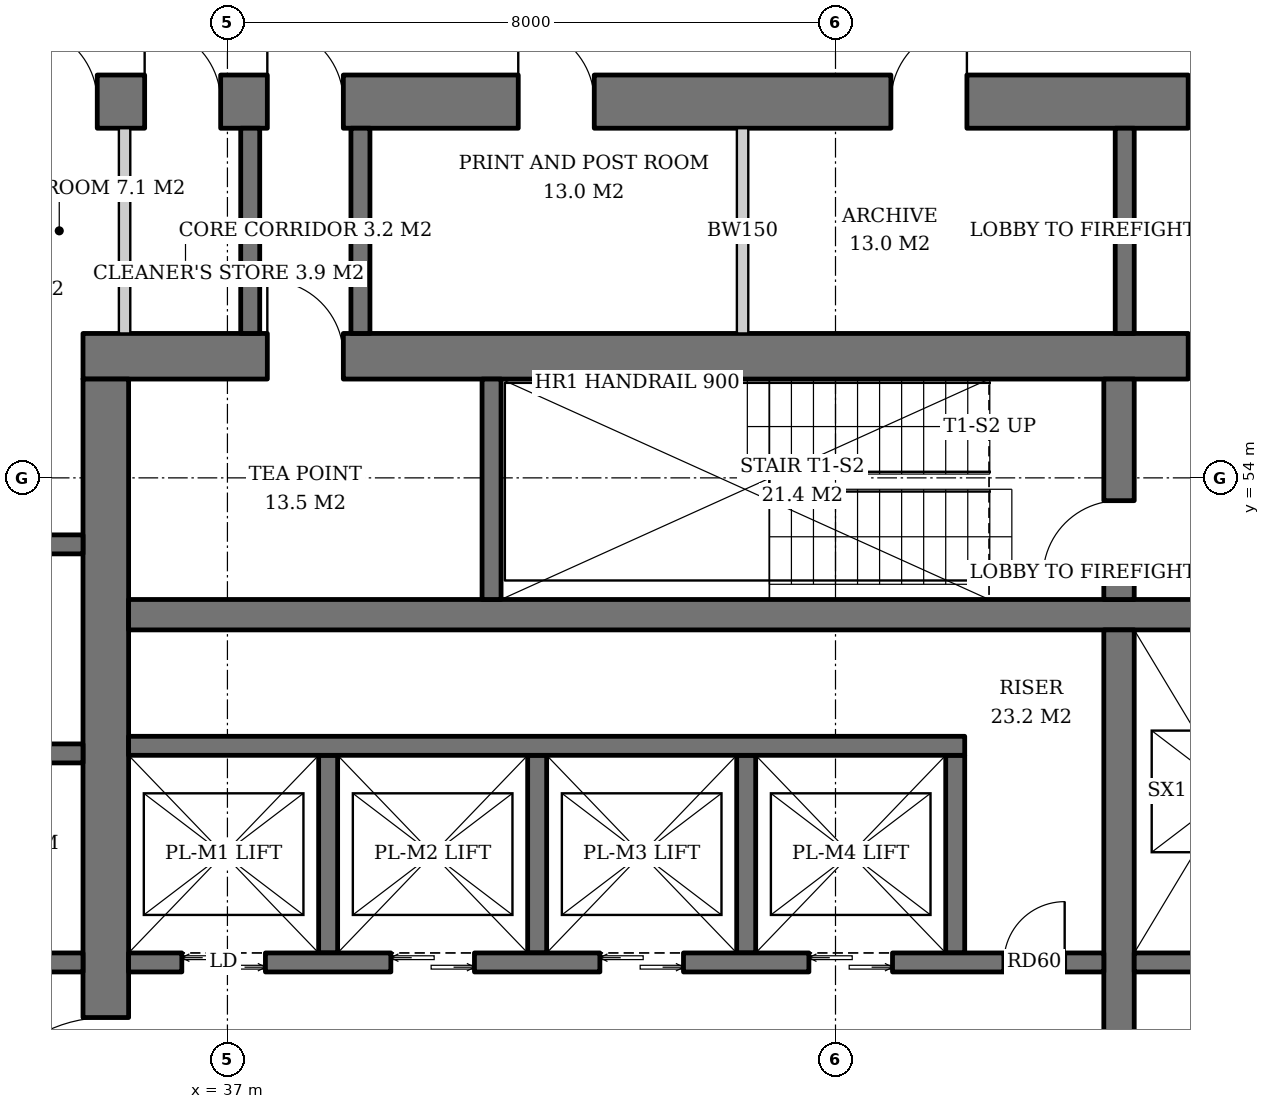
"""IFC4 building model, lengths in metres.
Left out: names, types, materials, properties, quantities, classifications, styles, units other than length and angle.
Written with IfcOpenShell. Run it as: python <this file> out.ifc"""

import sys

from ifc_helpers import new_model, si_unit, direction, frame, frame_2d, origin, place, context, subcontext, project, spatial, rectangle, extrude, element, fill, save


model = new_model("IFC4")
c1 = context("Model", 3, precision=1e-05, world=origin(), true_north=direction((0.0, 1.0)))
c2 = subcontext(c1, "Body", "Model", "MODEL_VIEW")
j1 = project(units=[si_unit("LENGTHUNIT", "METRE"), si_unit("PLANEANGLEUNIT", "RADIAN")], contexts=[c1])
p1 = place(None, origin())
s1 = spatial("IfcSite", under=j1, at=p1, CompositionType="ELEMENT")
p2 = place(p1, origin())
s2 = spatial("IfcBuilding", under=s1, at=p2, CompositionType="ELEMENT")
p3 = place(p2, frame((0.0, 0.0, 104.6)))
s3 = spatial("IfcBuildingStorey", under=s2, at=p3, CompositionType="ELEMENT", Elevation=104.6)
p4 = place(p3, frame((35.1, 55.6, 0.0), z_axis=(0.0, 0.0, 1.0), x_axis=(1.0, 0.0, 0.0)))
e1 = element("IfcWall", 1, at=p4, inside=s3, PredefinedType="SHEAR", context=c2, shape_type="SweptSolid", body=[
    extrude(rectangle(XDim=19.8, YDim=0.6, at=frame_2d((9.9, 0.0))), origin(), (0.0, 0.0, 1.0), 3.8),
])
p5 = place(p4, frame((14.54, 0.0, 0.0)))
e2 = element("IfcOpeningElement", 2, at=p5, cuts=e1, PredefinedType="OPENING", context=c2, shape_type="SweptSolid", body=[
    extrude(rectangle(XDim=1.0, YDim=2.1, at=frame_2d((0.5, 1.05))), frame((0.0, 0.31, 0.0), z_axis=(0.0, -1.0, 0.0), x_axis=(1.0, 0.0, 0.0)), (0.0, 0.0, 1.0), 0.62),
])
p6 = place(p4, frame((2.425, 0.0, 0.0)))
e3 = element("IfcOpeningElement", 3, at=p6, cuts=e1, PredefinedType="OPENING", context=c2, shape_type="SweptSolid", body=[
    extrude(rectangle(XDim=1.0, YDim=2.1, at=frame_2d((0.5, 1.05))), frame((0.0, 0.31, 0.0), z_axis=(0.0, -1.0, 0.0), x_axis=(1.0, 0.0, 0.0)), (0.0, 0.0, 1.0), 0.62),
])
p7 = place(p3, frame((35.4, 36.7, 0.0), z_axis=(0.0, 0.0, 1.0), x_axis=(0.0, 1.0, 0.0)))
e4 = element("IfcWall", 4, at=p7, inside=s3, PredefinedType="SHEAR", context=c2, shape_type="SweptSolid", body=[
    extrude(rectangle(XDim=18.6, YDim=0.6, at=frame_2d((9.3, 0.0))), origin(), (0.0, 0.0, 1.0), 3.8),
])
p8 = place(p7, frame((8.4, 0.0, 0.0)))
e5 = element("IfcOpeningElement", 5, at=p8, cuts=e4, PredefinedType="OPENING", context=c2, shape_type="SweptSolid", body=[
    extrude(rectangle(XDim=1.8, YDim=2.4, at=frame_2d((0.9, 1.2))), frame((0.0, 0.31, 0.0), z_axis=(0.0, -1.0, 0.0), x_axis=(1.0, 0.0, 0.0)), (0.0, 0.0, 1.0), 0.62),
])
p9 = place(p3, frame((31.7, 58.95, 0.0), z_axis=(0.0, 0.0, 1.0), x_axis=(1.0, 0.0, 0.0)))
e6 = element("IfcWall", 6, at=p9, inside=s3, PredefinedType="SHEAR", context=c2, shape_type="SweptSolid", body=[
    extrude(rectangle(XDim=26.6, YDim=0.7, at=frame_2d((13.3, 0.0))), origin(), (0.0, 0.0, 1.0), 3.8),
])
p10 = place(p9, frame((17.94, 0.0, 0.0)))
e7 = element("IfcOpeningElement", 7, at=p10, cuts=e6, PredefinedType="OPENING", context=c2, shape_type="SweptSolid", body=[
    extrude(rectangle(XDim=1.0, YDim=2.1, at=frame_2d((0.5, 1.05))), frame((0.0, 0.36, 0.0), z_axis=(0.0, -1.0, 0.0), x_axis=(1.0, 0.0, 0.0)), (0.0, 0.0, 1.0), 0.72),
])
p11 = place(p9, frame((5.825, 0.0, 0.0)))
e8 = element("IfcOpeningElement", 8, at=p11, cuts=e6, PredefinedType="OPENING", context=c2, shape_type="SweptSolid", body=[
    extrude(rectangle(XDim=1.0, YDim=2.1, at=frame_2d((0.5, 1.05))), frame((0.0, 0.36, 0.0), z_axis=(0.0, -1.0, 0.0), x_axis=(1.0, 0.0, 0.0)), (0.0, 0.0, 1.0), 0.72),
])
p12 = place(p9, frame((0.978, 0.0, 0.0)))
e9 = element("IfcOpeningElement", 9, at=p12, cuts=e6, PredefinedType="OPENING", context=c2, shape_type="SweptSolid", body=[
    extrude(rectangle(XDim=1.0, YDim=2.1, at=frame_2d((0.5, 1.05))), frame((0.0, 0.36, 0.0), z_axis=(0.0, -1.0, 0.0), x_axis=(1.0, 0.0, 0.0)), (0.0, 0.0, 1.0), 0.72),
])
p13 = place(p9, frame((2.587, 0.0, 0.0)))
e10 = element("IfcOpeningElement", 10, at=p13, cuts=e6, PredefinedType="OPENING", context=c2, shape_type="SweptSolid", body=[
    extrude(rectangle(XDim=1.0, YDim=2.1, at=frame_2d((0.5, 1.05))), frame((0.0, 0.36, 0.0), z_axis=(0.0, -1.0, 0.0), x_axis=(1.0, 0.0, 0.0)), (0.0, 0.0, 1.0), 0.72),
])
p14 = place(p9, frame((4.211, 0.0, 0.0)))
e11 = element("IfcOpeningElement", 11, at=p14, cuts=e6, PredefinedType="OPENING", context=c2, shape_type="SweptSolid", body=[
    extrude(rectangle(XDim=1.0, YDim=2.1, at=frame_2d((0.5, 1.05))), frame((0.0, 0.36, 0.0), z_axis=(0.0, -1.0, 0.0), x_axis=(1.0, 0.0, 0.0)), (0.0, 0.0, 1.0), 0.72),
])
p15 = place(p9, frame((9.126, 0.0, 0.0)))
e12 = element("IfcOpeningElement", 12, at=p15, cuts=e6, PredefinedType="OPENING", context=c2, shape_type="SweptSolid", body=[
    extrude(rectangle(XDim=1.0, YDim=2.1, at=frame_2d((0.5, 1.05))), frame((0.0, 0.36, 0.0), z_axis=(0.0, -1.0, 0.0), x_axis=(1.0, 0.0, 0.0)), (0.0, 0.0, 1.0), 0.72),
])
p16 = place(p9, frame((14.029, 0.0, 0.0)))
e13 = element("IfcOpeningElement", 13, at=p16, cuts=e6, PredefinedType="OPENING", context=c2, shape_type="SweptSolid", body=[
    extrude(rectangle(XDim=1.0, YDim=2.1, at=frame_2d((0.5, 1.05))), frame((0.0, 0.36, 0.0), z_axis=(0.0, -1.0, 0.0), x_axis=(1.0, 0.0, 0.0)), (0.0, 0.0, 1.0), 0.72),
])
p17 = place(p9, frame((22.4, 0.0, 0.0)))
e14 = element("IfcOpeningElement", 14, at=p17, cuts=e6, PredefinedType="OPENING", context=c2, shape_type="SweptSolid", body=[
    extrude(rectangle(XDim=1.0, YDim=2.1, at=frame_2d((0.5, 1.05))), frame((0.0, 0.36, 0.0), z_axis=(0.0, -1.0, 0.0), x_axis=(1.0, 0.0, 0.0)), (0.0, 0.0, 1.0), 0.72),
])
p18 = place(p3, frame((35.7, 52.2, 0.0), z_axis=(0.0, 0.0, 1.0), x_axis=(1.0, 0.0, 0.0)))
e15 = element("IfcWall", 15, at=p18, inside=s3, PredefinedType="SHEAR", context=c2, shape_type="SweptSolid", body=[
    extrude(rectangle(XDim=18.6, YDim=0.4, at=frame_2d((9.3, 0.0))), origin(), (0.0, 0.0, 1.0), 3.8),
])
p19 = place(p3, frame((48.73, 40.0, 0.0), z_axis=(0.0, 0.0, 1.0), x_axis=(0.0, 1.0, 0.0)))
e16 = element("IfcWall", 16, at=p19, inside=s3, PredefinedType="SHEAR", context=c2, shape_type="SweptSolid", body=[
    extrude(rectangle(XDim=12.0, YDim=0.4, at=frame_2d((6.0, 0.0))), origin(), (0.0, 0.0, 1.0), 3.8),
])
p20 = place(p3, frame((48.73, 52.4, 0.0), z_axis=(0.0, 0.0, 1.0), x_axis=(0.0, 1.0, 0.0)))
e17 = element("IfcWall", 17, at=p20, inside=s3, PredefinedType="SHEAR", context=c2, shape_type="SweptSolid", body=[
    extrude(rectangle(XDim=2.9, YDim=0.4, at=frame_2d((1.45, 0.0))), origin(), (0.0, 0.0, 1.0), 3.8),
])
p21 = place(p20, frame((0.3, 0.0, 0.0)))
e18 = element("IfcOpeningElement", 18, at=p21, cuts=e17, PredefinedType="OPENING", context=c2, shape_type="SweptSolid", body=[
    extrude(rectangle(XDim=1.0, YDim=2.1, at=frame_2d((0.5, 1.05))), frame((0.0, 0.21, 0.0), z_axis=(0.0, -1.0, 0.0), x_axis=(1.0, 0.0, 0.0)), (0.0, 0.0, 1.0), 0.42),
])
p22 = place(p3, frame((40.475, 52.4, 0.0), z_axis=(0.0, 0.0, 1.0), x_axis=(0.0, 1.0, 0.0)))
e19 = element("IfcWall", 19, at=p22, inside=s3, PredefinedType="SHEAR", context=c2, shape_type="SweptSolid", body=[
    extrude(rectangle(XDim=2.9, YDim=0.25, at=frame_2d((1.45, 0.0))), origin(), (0.0, 0.0, 1.0), 3.8),
])
for number, where, z_axis, x_axis in (
    (20, (38.325, 47.75, 0.0), (0.0, 0.0, 1.0), (0.0, 1.0, 0.0)),
    (21, (41.075, 47.75, 0.0), (0.0, 0.0, 1.0), (0.0, 1.0, 0.0)),
    (22, (43.825, 47.75, 0.0), (0.0, 0.0, 1.0), (0.0, 1.0, 0.0)),
    (23, (46.575, 47.75, 0.0), (0.0, 0.0, 1.0), (0.0, 1.0, 0.0)),
):
    element("IfcWall", number, at=place(p3, frame(where, z_axis=z_axis, x_axis=x_axis)), inside=s3, PredefinedType="SHEAR", context=c2, shape_type="SweptSolid", body=[
        extrude(rectangle(XDim=2.6, YDim=0.25, at=frame_2d((1.3, 0.0))), origin(), (0.0, 0.0, 1.0), 3.8),
    ])
p23 = place(p3, frame((35.7, 50.475, 0.0), z_axis=(0.0, 0.0, 1.0), x_axis=(1.0, 0.0, 0.0)))
e24 = element("IfcWall", 24, at=p23, inside=s3, PredefinedType="SHEAR", context=c2, shape_type="SweptSolid", body=[
    extrude(rectangle(XDim=11.0, YDim=0.25, at=frame_2d((5.5, 0.0))), origin(), (0.0, 0.0, 1.0), 3.8),
])
p24 = place(p3, frame((35.7, 47.625, 0.0), z_axis=(0.0, 0.0, 1.0), x_axis=(1.0, 0.0, 0.0)))
e25 = element("IfcWall", 25, at=p24, inside=s3, PredefinedType="SHEAR", context=c2, shape_type="SweptSolid", body=[
    extrude(rectangle(XDim=12.83, YDim=0.25, at=frame_2d((6.415, 0.0))), origin(), (0.0, 0.0, 1.0), 3.8),
])
p25 = place(p24, frame((0.7, 0.0, 0.0)))
e26 = element("IfcOpeningElement", 26, at=p25, cuts=e25, PredefinedType="OPENING", context=c2, shape_type="SweptSolid", body=[
    extrude(rectangle(XDim=1.1, YDim=2.2, at=frame_2d((0.55, 1.1))), frame((0.0, 0.135, 0.0), z_axis=(0.0, -1.0, 0.0), x_axis=(1.0, 0.0, 0.0)), (0.0, 0.0, 1.0), 0.27),
])
p26 = place(p24, frame((3.45, 0.0, 0.0)))
e27 = element("IfcOpeningElement", 27, at=p26, cuts=e25, PredefinedType="OPENING", context=c2, shape_type="SweptSolid", body=[
    extrude(rectangle(XDim=1.1, YDim=2.2, at=frame_2d((0.55, 1.1))), frame((0.0, 0.135, 0.0), z_axis=(0.0, -1.0, 0.0), x_axis=(1.0, 0.0, 0.0)), (0.0, 0.0, 1.0), 0.27),
])
p27 = place(p24, frame((6.2, 0.0, 0.0)))
e28 = element("IfcOpeningElement", 28, at=p27, cuts=e25, PredefinedType="OPENING", context=c2, shape_type="SweptSolid", body=[
    extrude(rectangle(XDim=1.1, YDim=2.2, at=frame_2d((0.55, 1.1))), frame((0.0, 0.135, 0.0), z_axis=(0.0, -1.0, 0.0), x_axis=(1.0, 0.0, 0.0)), (0.0, 0.0, 1.0), 0.27),
])
p28 = place(p24, frame((8.95, 0.0, 0.0)))
e29 = element("IfcOpeningElement", 29, at=p28, cuts=e25, PredefinedType="OPENING", context=c2, shape_type="SweptSolid", body=[
    extrude(rectangle(XDim=1.1, YDim=2.2, at=frame_2d((0.55, 1.1))), frame((0.0, 0.135, 0.0), z_axis=(0.0, -1.0, 0.0), x_axis=(1.0, 0.0, 0.0)), (0.0, 0.0, 1.0), 0.27),
])
p29 = place(p24, frame((11.515, 0.0, 0.0)))
e30 = element("IfcOpeningElement", 30, at=p29, cuts=e25, PredefinedType="OPENING", context=c2, shape_type="SweptSolid", body=[
    extrude(rectangle(XDim=0.8, YDim=2.0, at=frame_2d((0.4, 1.0))), frame((0.0, 0.135, 0.0), z_axis=(0.0, -1.0, 0.0), x_axis=(1.0, 0.0, 0.0)), (0.0, 0.0, 1.0), 0.27),
])
p30 = place(p3, frame((48.93, 47.625, 0.0), z_axis=(0.0, 0.0, 1.0), x_axis=(1.0, 0.0, 0.0)))
e31 = element("IfcWall", 31, at=p30, inside=s3, PredefinedType="SHEAR", context=c2, shape_type="SweptSolid", body=[
    extrude(rectangle(XDim=5.37, YDim=0.25, at=frame_2d((2.685, 0.0))), origin(), (0.0, 0.0, 1.0), 3.8),
])
for number, where, z_axis, x_axis in (
    (32, (32.4, 47.625, 0.0), (0.0, 0.0, 1.0), (1.0, 0.0, 0.0)),
    (33, (32.4, 50.375, 0.0), (0.0, 0.0, 1.0), (1.0, 0.0, 0.0)),
    (34, (32.4, 53.125, 0.0), (0.0, 0.0, 1.0), (1.0, 0.0, 0.0)),
):
    element("IfcWall", number, at=place(p3, frame(where, z_axis=z_axis, x_axis=x_axis)), inside=s3, PredefinedType="SHEAR", context=c2, shape_type="SweptSolid", body=[
        extrude(rectangle(XDim=2.7, YDim=0.25, at=frame_2d((1.35, 0.0))), origin(), (0.0, 0.0, 1.0), 3.8),
    ])
for number, where, z_axis, x_axis in (
    (35, (48.805, 55.9, 0.0), (0.0, 0.0, 1.0), (0.0, 1.0, 0.0)),
    (36, (37.3, 55.9, 0.0), (0.0, 0.0, 1.0), (0.0, 1.0, 0.0)),
    (37, (38.75, 55.9, 0.0), (0.0, 0.0, 1.0), (0.0, 1.0, 0.0)),
):
    element("IfcWall", number, at=place(p3, frame(where, z_axis=z_axis, x_axis=x_axis)), inside=s3, PredefinedType="SOLIDWALL", context=c2, shape_type="SweptSolid", body=[
        extrude(rectangle(XDim=2.7, YDim=0.25, at=frame_2d((1.35, 0.0))), origin(), (0.0, 0.0, 1.0), 3.62),
    ])
for number, where, z_axis, x_axis in (
    (38, (35.647, 55.9, 0.0), (0.0, 0.0, 1.0), (0.0, 1.0, 0.0)),
    (39, (43.778, 55.9, 0.0), (0.0, 0.0, 1.0), (0.0, 1.0, 0.0)),
):
    element("IfcWall", number, at=place(p3, frame(where, z_axis=z_axis, x_axis=x_axis)), inside=s3, PredefinedType="SOLIDWALL", context=c2, shape_type="SweptSolid", body=[
        extrude(rectangle(XDim=2.7, YDim=0.15, at=frame_2d((1.35, 0.0))), origin(), (0.0, 0.0, 1.0), 3.62),
    ])
p31 = place(p25, origin())
e40 = element("IfcDoor", 40, at=p31, inside=s3, OperationType="DOUBLE_DOOR_SLIDING", PredefinedType="DOOR", context=c2, shape_type="SweptSolid", body=[
    extrude(rectangle(XDim=1.1, YDim=2.2, at=frame_2d((0.55, 1.1))), frame((0.0, 0.025, 0.0), z_axis=(0.0, -1.0, 0.0), x_axis=(1.0, 0.0, 0.0)), (0.0, 0.0, 1.0), 0.05),
])
fill(e26, e40)
p32 = place(p26, origin())
e41 = element("IfcDoor", 41, at=p32, inside=s3, OperationType="DOUBLE_DOOR_SLIDING", PredefinedType="DOOR", context=c2, shape_type="SweptSolid", body=[
    extrude(rectangle(XDim=1.1, YDim=2.2, at=frame_2d((0.55, 1.1))), frame((0.0, 0.025, 0.0), z_axis=(0.0, -1.0, 0.0), x_axis=(1.0, 0.0, 0.0)), (0.0, 0.0, 1.0), 0.05),
])
fill(e27, e41)
p33 = place(p27, origin())
e42 = element("IfcDoor", 42, at=p33, inside=s3, OperationType="DOUBLE_DOOR_SLIDING", PredefinedType="DOOR", context=c2, shape_type="SweptSolid", body=[
    extrude(rectangle(XDim=1.1, YDim=2.2, at=frame_2d((0.55, 1.1))), frame((0.0, 0.025, 0.0), z_axis=(0.0, -1.0, 0.0), x_axis=(1.0, 0.0, 0.0)), (0.0, 0.0, 1.0), 0.05),
])
fill(e28, e42)
p34 = place(p28, origin())
e43 = element("IfcDoor", 43, at=p34, inside=s3, OperationType="DOUBLE_DOOR_SLIDING", PredefinedType="DOOR", context=c2, shape_type="SweptSolid", body=[
    extrude(rectangle(XDim=1.1, YDim=2.2, at=frame_2d((0.55, 1.1))), frame((0.0, 0.025, 0.0), z_axis=(0.0, -1.0, 0.0), x_axis=(1.0, 0.0, 0.0)), (0.0, 0.0, 1.0), 0.05),
])
fill(e29, e43)
p35 = place(p29, origin())
e44 = element("IfcDoor", 44, at=p35, inside=s3, OperationType="SINGLE_SWING_RIGHT", PredefinedType="DOOR", context=c2, shape_type="SweptSolid", body=[
    extrude(rectangle(XDim=0.8, YDim=2.0, at=frame_2d((0.4, 1.0))), frame((0.0, 0.025, 0.0), z_axis=(0.0, -1.0, 0.0), x_axis=(1.0, 0.0, 0.0)), (0.0, 0.0, 1.0), 0.05),
])
fill(e30, e44)
p36 = place(p21, origin())
e45 = element("IfcDoor", 45, at=p36, inside=s3, OperationType="SINGLE_SWING_LEFT", PredefinedType="DOOR", context=c2, shape_type="SweptSolid", body=[
    extrude(rectangle(XDim=1.0, YDim=2.1, at=frame_2d((0.5, 1.05))), frame((0.0, 0.025, 0.0), z_axis=(0.0, -1.0, 0.0), x_axis=(1.0, 0.0, 0.0)), (0.0, 0.0, 1.0), 0.05),
])
fill(e18, e45)
p37 = place(p5, origin())
e46 = element("IfcDoor", 46, at=p37, inside=s3, OperationType="SINGLE_SWING_RIGHT", PredefinedType="DOOR", context=c2, shape_type="SweptSolid", body=[
    extrude(rectangle(XDim=1.0, YDim=2.1, at=frame_2d((0.5, 1.05))), frame((0.0, 0.025, 0.0), z_axis=(0.0, -1.0, 0.0), x_axis=(1.0, 0.0, 0.0)), (0.0, 0.0, 1.0), 0.05),
])
fill(e2, e46)
p38 = place(p8, origin())
e47 = element("IfcDoor", 47, at=p38, inside=s3, OperationType="DOUBLE_DOOR_SINGLE_SWING", PredefinedType="DOOR", context=c2, shape_type="SweptSolid", body=[
    extrude(rectangle(XDim=1.8, YDim=2.4, at=frame_2d((0.9, 1.2))), frame((0.0, 0.025, 0.0), z_axis=(0.0, -1.0, 0.0), x_axis=(1.0, 0.0, 0.0)), (0.0, 0.0, 1.0), 0.05),
])
fill(e5, e47)
p39 = place(p10, origin())
e48 = element("IfcDoor", 48, at=p39, inside=s3, OperationType="SINGLE_SWING_RIGHT", PredefinedType="DOOR", context=c2, shape_type="SweptSolid", body=[
    extrude(rectangle(XDim=1.0, YDim=2.1, at=frame_2d((0.5, 1.05))), frame((0.0, 0.025, 0.0), z_axis=(0.0, -1.0, 0.0), x_axis=(1.0, 0.0, 0.0)), (0.0, 0.0, 1.0), 0.05),
])
fill(e7, e48)
p40 = place(p11, origin())
e49 = element("IfcDoor", 49, at=p40, inside=s3, OperationType="SINGLE_SWING_LEFT", PredefinedType="DOOR", context=c2, shape_type="SweptSolid", body=[
    extrude(rectangle(XDim=1.0, YDim=2.1, at=frame_2d((0.5, 1.05))), frame((0.0, 0.025, 0.0), z_axis=(0.0, -1.0, 0.0), x_axis=(1.0, 0.0, 0.0)), (0.0, 0.0, 1.0), 0.05),
])
fill(e8, e49)
p41 = place(p6, origin())
e50 = element("IfcDoor", 50, at=p41, inside=s3, OperationType="SINGLE_SWING_LEFT", PredefinedType="DOOR", context=c2, shape_type="SweptSolid", body=[
    extrude(rectangle(XDim=1.0, YDim=2.1, at=frame_2d((0.5, 1.05))), frame((0.0, -0.24, 0.0), z_axis=(0.0, -1.0, 0.0), x_axis=(1.0, 0.0, 0.0)), (0.0, 0.0, 1.0), 0.05),
])
fill(e3, e50)
p42 = place(p13, origin())
e51 = element("IfcDoor", 51, at=p42, inside=s3, OperationType="SINGLE_SWING_LEFT", PredefinedType="DOOR", context=c2, shape_type="SweptSolid", body=[
    extrude(rectangle(XDim=1.0, YDim=2.1, at=frame_2d((0.5, 1.05))), frame((0.0, -0.29, 0.0), z_axis=(0.0, -1.0, 0.0), x_axis=(1.0, 0.0, 0.0)), (0.0, 0.0, 1.0), 0.05),
])
fill(e10, e51)
p43 = place(p14, origin())
e52 = element("IfcDoor", 52, at=p43, inside=s3, OperationType="SINGLE_SWING_LEFT", PredefinedType="DOOR", context=c2, shape_type="SweptSolid", body=[
    extrude(rectangle(XDim=1.0, YDim=2.1, at=frame_2d((0.5, 1.05))), frame((0.0, -0.29, 0.0), z_axis=(0.0, -1.0, 0.0), x_axis=(1.0, 0.0, 0.0)), (0.0, 0.0, 1.0), 0.05),
])
fill(e11, e52)
p44 = place(p15, origin())
e53 = element("IfcDoor", 53, at=p44, inside=s3, OperationType="SINGLE_SWING_LEFT", PredefinedType="DOOR", context=c2, shape_type="SweptSolid", body=[
    extrude(rectangle(XDim=1.0, YDim=2.1, at=frame_2d((0.5, 1.05))), frame((0.0, -0.29, 0.0), z_axis=(0.0, -1.0, 0.0), x_axis=(1.0, 0.0, 0.0)), (0.0, 0.0, 1.0), 0.05),
])
fill(e12, e53)
p45 = place(p16, origin())
e54 = element("IfcDoor", 54, at=p45, inside=s3, OperationType="SINGLE_SWING_RIGHT", PredefinedType="DOOR", context=c2, shape_type="SweptSolid", body=[
    extrude(rectangle(XDim=1.0, YDim=2.1, at=frame_2d((0.5, 1.05))), frame((0.0, -0.29, 0.0), z_axis=(0.0, -1.0, 0.0), x_axis=(1.0, 0.0, 0.0)), (0.0, 0.0, 1.0), 0.05),
])
fill(e13, e54)
save(model, sys.argv[1])
